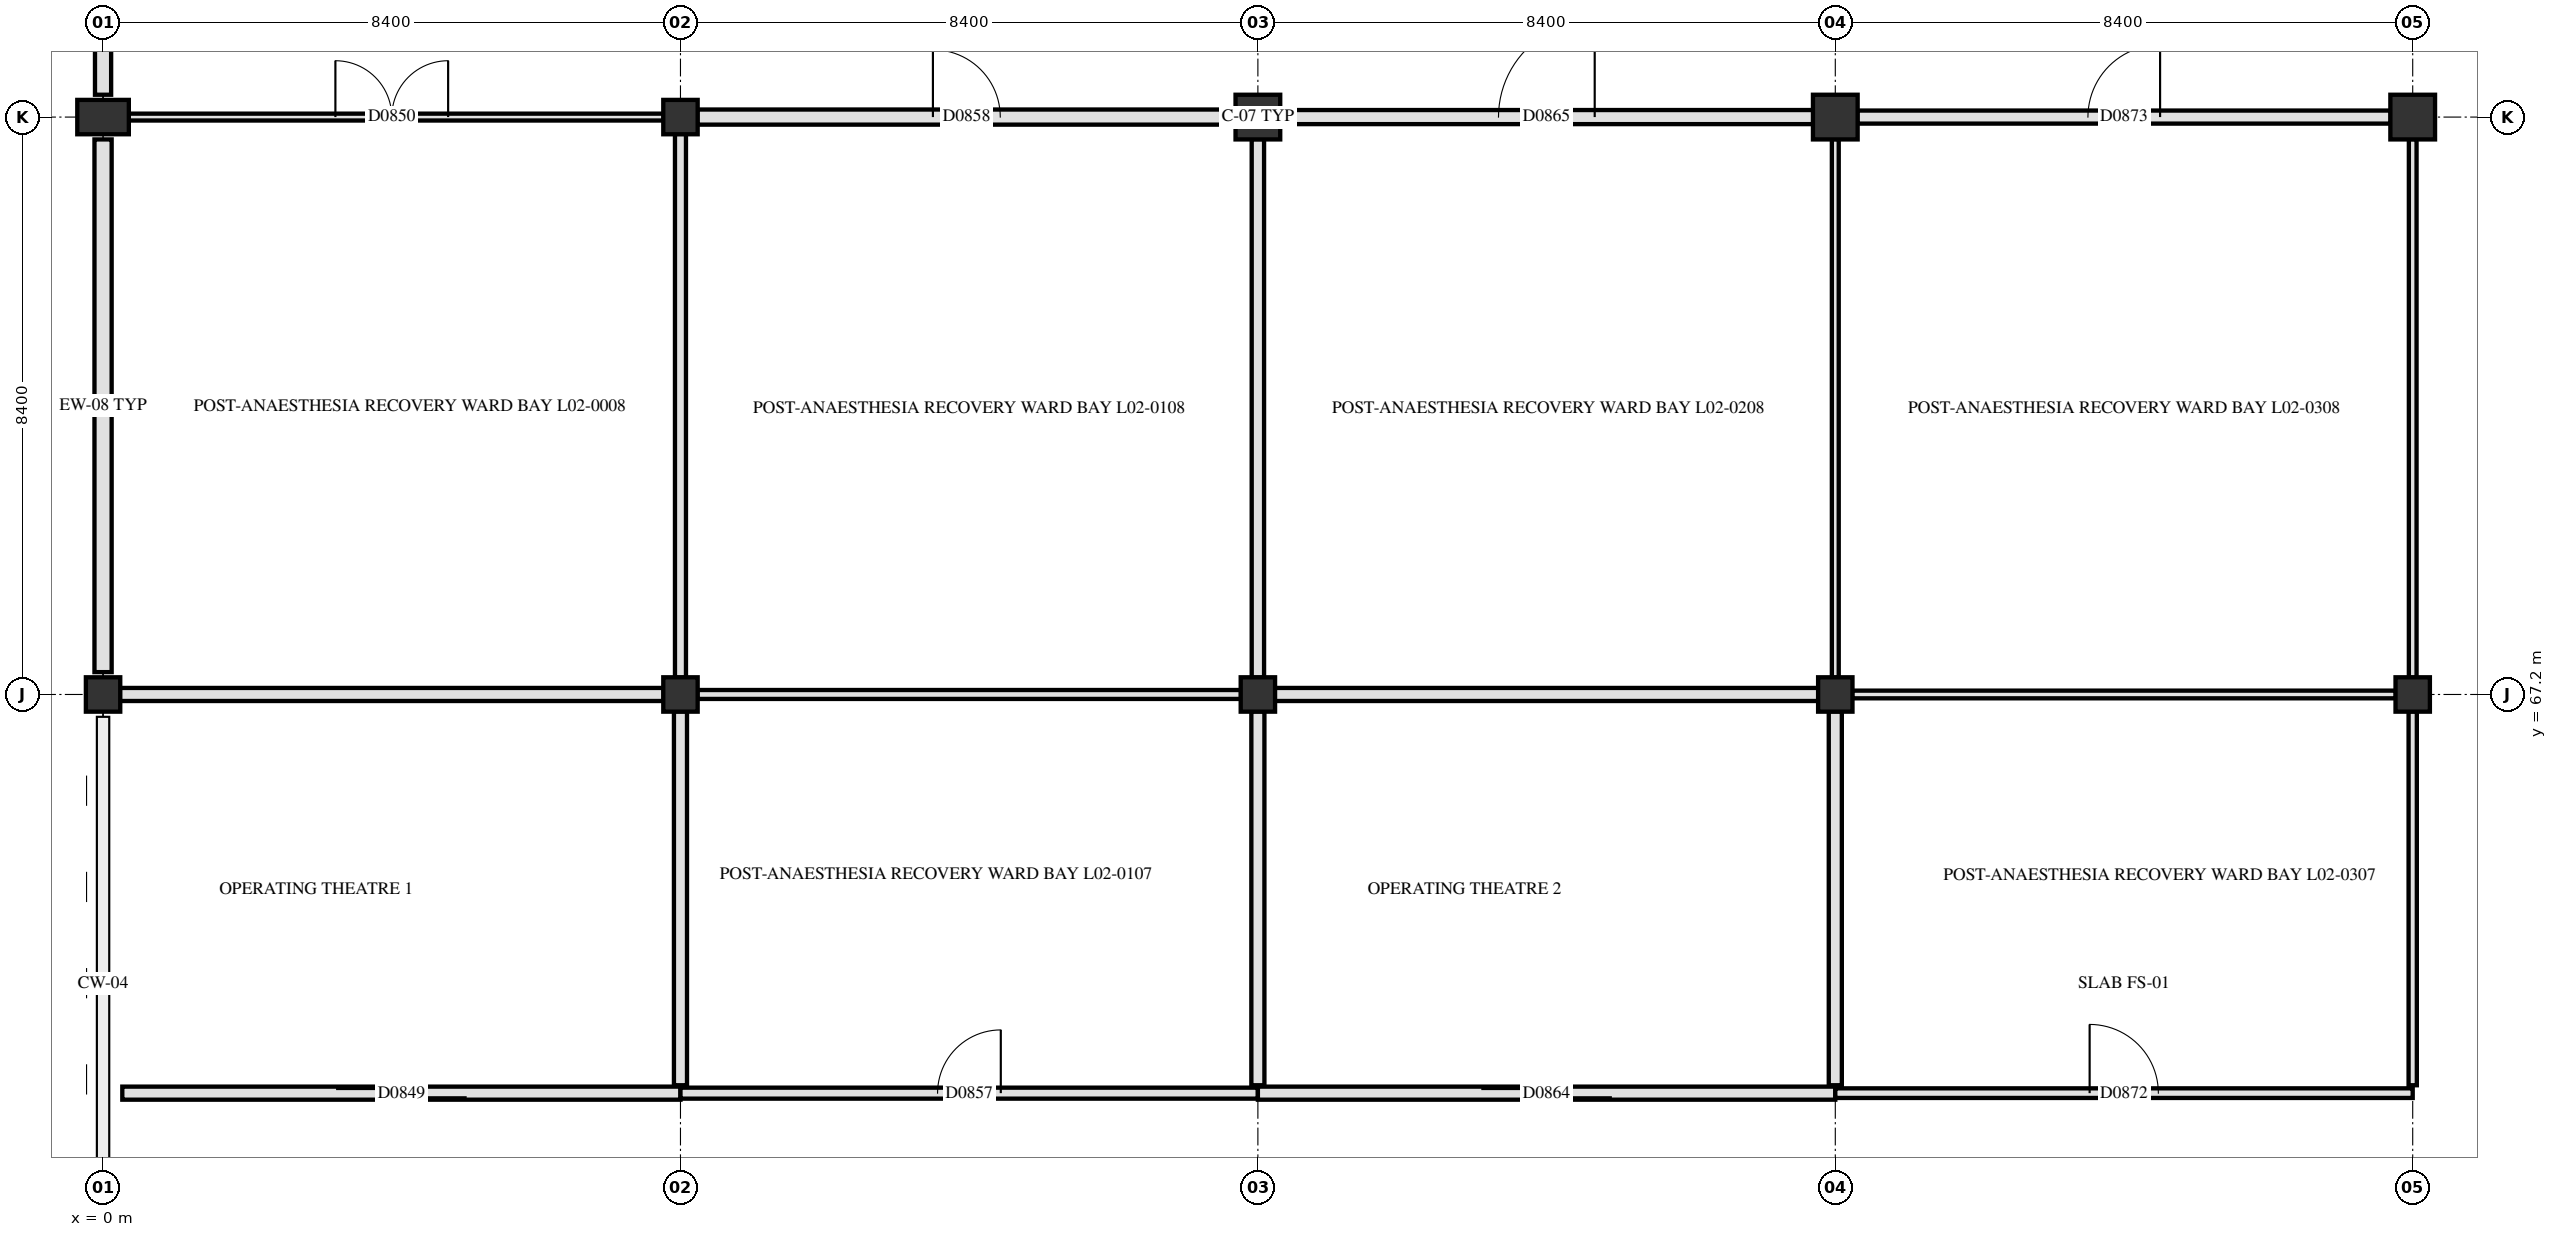
"""IFC4 building model, lengths in metres.
Left out: names, types, materials, properties, quantities, classifications, styles, units other than length and angle.
Written with IfcOpenShell. Run it as: python <this file> out.ifc"""

import sys

from ifc_helpers import new_model, si_unit, direction, frame, frame_2d, origin, origin_2d, place, context, subcontext, project, spatial, rectangle, circle, extrude, element, fill, save


model = new_model("IFC4")
c1 = context("Model", 3, precision=1e-05, world=origin(), true_north=direction((0.0, 1.0)))
c2 = subcontext(c1, "Body", "Model", "MODEL_VIEW")
j1 = project(units=[si_unit("LENGTHUNIT", "METRE"), si_unit("PLANEANGLEUNIT", "RADIAN")], contexts=[c1])
p1 = place(None, origin())
s1 = spatial("IfcSite", under=j1, at=p1, CompositionType="ELEMENT")
p2 = place(p1, origin())
s2 = spatial("IfcBuilding", under=s1, at=p2, CompositionType="ELEMENT")
p3 = place(p2, frame((0.0, 0.0, 9.3)))
s3 = spatial("IfcBuildingStorey", under=s2, at=p3, CompositionType="ELEMENT", Elevation=9.3)
p4 = place(p3, frame((0.0, 67.2, 0.0), z_axis=(0.0, 0.0, 1.0), x_axis=(1.0, 0.0, 0.0)))
e1 = element("IfcColumn", 1, at=p4, inside=s3, PredefinedType="COLUMN", context=c2, shape_type="SweptSolid", body=[
    extrude(rectangle(XDim=0.5, YDim=0.5, at=origin_2d()), origin(), (0.0, 0.0, 1.0), 5.1),
])
p5 = place(p3, frame((0.0, 75.6, 0.0), z_axis=(0.0, 0.0, 1.0), x_axis=(0.0, 1.0, 0.0)))
e2 = element("IfcColumn", 2, at=p5, inside=s3, PredefinedType="PILASTER", context=c2, shape_type="SweptSolid", body=[
    extrude(rectangle(XDim=0.5, YDim=0.75, at=origin_2d()), origin(), (0.0, 0.0, 1.0), 5.1),
])
for number, where, z_axis, x_axis in (
    (3, (8.4, 67.2, 0.0), (0.0, 0.0, 1.0), (1.0, 0.0, 0.0)),
    (4, (8.4, 75.6, 0.0), (0.0, 0.0, 1.0), (1.0, 0.0, 0.0)),
    (5, (16.8, 67.2, 0.0), (0.0, 0.0, 1.0), (1.0, 0.0, 0.0)),
):
    element("IfcColumn", number, at=place(p3, frame(where, z_axis=z_axis, x_axis=x_axis)), inside=s3, PredefinedType="COLUMN", context=c2, shape_type="SweptSolid", body=[
        extrude(rectangle(XDim=0.5, YDim=0.5, at=origin_2d()), origin(), (0.0, 0.0, 1.0), 5.1),
    ])
p6 = place(p3, frame((16.8, 75.6, 0.0), z_axis=(0.0, 0.0, 1.0), x_axis=(1.0, 0.0, 0.0)))
e6 = element("IfcColumn", 6, at=p6, inside=s3, PredefinedType="COLUMN", context=c2, shape_type="SweptSolid", body=[
    extrude(circle(Radius=0.325, at=origin_2d()), origin(), (0.0, 0.0, 1.0), 5.1),
])
p7 = place(p3, frame((25.2, 67.2, 0.0), z_axis=(0.0, 0.0, 1.0), x_axis=(1.0, 0.0, 0.0)))
e7 = element("IfcColumn", 7, at=p7, inside=s3, PredefinedType="COLUMN", context=c2, shape_type="SweptSolid", body=[
    extrude(rectangle(XDim=0.5, YDim=0.5, at=origin_2d()), origin(), (0.0, 0.0, 1.0), 5.1),
])
p8 = place(p3, frame((25.2, 75.6, 0.0), z_axis=(0.0, 0.0, 1.0), x_axis=(1.0, 0.0, 0.0)))
e8 = element("IfcColumn", 8, at=p8, inside=s3, PredefinedType="COLUMN", context=c2, shape_type="SweptSolid", body=[
    extrude(circle(Radius=0.325, at=origin_2d()), origin(), (0.0, 0.0, 1.0), 5.1),
])
p9 = place(p3, frame((33.6, 67.2, 0.0), z_axis=(0.0, 0.0, 1.0), x_axis=(1.0, 0.0, 0.0)))
e9 = element("IfcColumn", 9, at=p9, inside=s3, PredefinedType="COLUMN", context=c2, shape_type="SweptSolid", body=[
    extrude(rectangle(XDim=0.5, YDim=0.5, at=origin_2d()), origin(), (0.0, 0.0, 1.0), 5.1),
])
p10 = place(p3, frame((33.6, 75.6, 0.0), z_axis=(0.0, 0.0, 1.0), x_axis=(1.0, 0.0, 0.0)))
e10 = element("IfcColumn", 10, at=p10, inside=s3, PredefinedType="COLUMN", context=c2, shape_type="SweptSolid", body=[
    extrude(circle(Radius=0.325, at=origin_2d()), origin(), (0.0, 0.0, 1.0), 5.1),
])
p11 = place(p3, frame((0.0, 67.525, 0.0), z_axis=(0.0, 0.0, 1.0), x_axis=(0.0, 1.0, 0.0)))
e11 = element("IfcWall", 11, at=p11, inside=s3, PredefinedType="SOLIDWALL", context=c2, shape_type="SweptSolid", body=[
    extrude(rectangle(XDim=7.75, YDim=0.25, at=frame_2d((3.875, 0.0))), origin(), (0.0, 0.0, 1.0), 4.07),
])
p12 = place(p3, frame((0.0, 75.925, 0.0), z_axis=(0.0, 0.0, 1.0), x_axis=(0.0, 1.0, 0.0)))
e12 = element("IfcWall", 12, at=p12, inside=s3, PredefinedType="SOLIDWALL", context=c2, shape_type="SweptSolid", body=[
    extrude(rectangle(XDim=7.75, YDim=0.235, at=frame_2d((3.875, 0.0))), origin(), (0.0, 0.0, 1.0), 4.07),
])
p13 = place(p12, frame((1.012, 0.0, 0.85)))
e13 = element("IfcOpeningElement", 13, at=p13, cuts=e12, PredefinedType="OPENING", context=c2, shape_type="SweptSolid", body=[
    extrude(rectangle(XDim=1.85, YDim=1.3, at=frame_2d((0.925, 0.65))), frame((0.0, 0.127, 0.0), z_axis=(0.0, -1.0, 0.0), x_axis=(1.0, 0.0, 0.0)), (0.0, 0.0, 1.0), 0.255),
])
p14 = place(p12, frame((5.312, 0.0, 0.85)))
e14 = element("IfcOpeningElement", 14, at=p14, cuts=e12, PredefinedType="OPENING", context=c2, shape_type="SweptSolid", body=[
    extrude(rectangle(XDim=1.0, YDim=1.42, at=frame_2d((0.5, 0.71))), frame((0.0, 0.127, 0.0), z_axis=(0.0, -1.0, 0.0), x_axis=(1.0, 0.0, 0.0)), (0.0, 0.0, 1.0), 0.255),
])
p15 = place(p3, frame((0.28, 61.4, 0.0), z_axis=(0.0, 0.0, 1.0), x_axis=(1.0, 0.0, 0.0)))
e15 = element("IfcWall", 15, at=p15, inside=s3, PredefinedType="PARTITIONING", context=c2, shape_type="SweptSolid", body=[
    extrude(rectangle(XDim=8.12, YDim=0.19, at=frame_2d((4.06, 0.0))), origin(), (0.0, 0.0, 1.0), 4.17),
])
p16 = place(p15, frame((3.11, 0.0, 0.0)))
e16 = element("IfcOpeningElement", 16, at=p16, cuts=e15, PredefinedType="OPENING", context=c2, shape_type="SweptSolid", body=[
    extrude(rectangle(XDim=1.9, YDim=2.3, at=frame_2d((0.95, 1.15))), frame((0.0, 0.105, 0.0), z_axis=(0.0, -1.0, 0.0), x_axis=(1.0, 0.0, 0.0)), (0.0, 0.0, 1.0), 0.21),
])
p17 = place(p3, frame((8.4, 61.4, 0.0), z_axis=(0.0, 0.0, 1.0), x_axis=(1.0, 0.0, 0.0)))
e17 = element("IfcWall", 17, at=p17, inside=s3, PredefinedType="PARTITIONING", context=c2, shape_type="SweptSolid", body=[
    extrude(rectangle(XDim=8.4, YDim=0.16, at=frame_2d((4.2, 0.0))), origin(), (0.0, 0.0, 1.0), 4.17),
])
p18 = place(p17, frame((3.74, 0.0, 0.0)))
e18 = element("IfcOpeningElement", 18, at=p18, cuts=e17, PredefinedType="OPENING", context=c2, shape_type="SweptSolid", body=[
    extrude(rectangle(XDim=0.92, YDim=2.08, at=frame_2d((0.46, 1.04))), frame((0.0, 0.09, 0.0), z_axis=(0.0, -1.0, 0.0), x_axis=(1.0, 0.0, 0.0)), (0.0, 0.0, 1.0), 0.18),
])
p19 = place(p3, frame((16.8, 61.4, 0.0), z_axis=(0.0, 0.0, 1.0), x_axis=(1.0, 0.0, 0.0)))
e19 = element("IfcWall", 19, at=p19, inside=s3, PredefinedType="PARTITIONING", context=c2, shape_type="SweptSolid", body=[
    extrude(rectangle(XDim=8.4, YDim=0.19, at=frame_2d((4.2, 0.0))), origin(), (0.0, 0.0, 1.0), 4.17),
])
p20 = place(p19, frame((3.25, 0.0, 0.0)))
e20 = element("IfcOpeningElement", 20, at=p20, cuts=e19, PredefinedType="OPENING", context=c2, shape_type="SweptSolid", body=[
    extrude(rectangle(XDim=1.9, YDim=2.3, at=frame_2d((0.95, 1.15))), frame((0.0, 0.105, 0.0), z_axis=(0.0, -1.0, 0.0), x_axis=(1.0, 0.0, 0.0)), (0.0, 0.0, 1.0), 0.21),
])
p21 = place(p3, frame((25.2, 61.4, 0.0), z_axis=(0.0, 0.0, 1.0), x_axis=(1.0, 0.0, 0.0)))
e21 = element("IfcWall", 21, at=p21, inside=s3, PredefinedType="PARTITIONING", context=c2, shape_type="SweptSolid", body=[
    extrude(rectangle(XDim=8.4, YDim=0.14, at=frame_2d((4.2, 0.0))), origin(), (0.0, 0.0, 1.0), 4.17),
])
p22 = place(p21, frame((3.7, 0.0, 0.0)))
e22 = element("IfcOpeningElement", 22, at=p22, cuts=e21, PredefinedType="OPENING", context=c2, shape_type="SweptSolid", body=[
    extrude(rectangle(XDim=1.0, YDim=2.15, at=frame_2d((0.5, 1.075))), frame((0.0, 0.08, 0.0), z_axis=(0.0, -1.0, 0.0), x_axis=(1.0, 0.0, 0.0)), (0.0, 0.0, 1.0), 0.16),
])
p23 = place(p3, frame((0.245, 67.2, 0.0), z_axis=(0.0, 0.0, 1.0), x_axis=(1.0, 0.0, 0.0)))
e23 = element("IfcWall", 23, at=p23, inside=s3, PredefinedType="PARTITIONING", context=c2, shape_type="SweptSolid", body=[
    extrude(rectangle(XDim=7.91, YDim=0.19, at=frame_2d((3.955, 0.0))), origin(), (0.0, 0.0, 1.0), 4.02),
])
p24 = place(p3, frame((8.645, 67.2, 0.0), z_axis=(0.0, 0.0, 1.0), x_axis=(1.0, 0.0, 0.0)))
e24 = element("IfcWall", 24, at=p24, inside=s3, PredefinedType="PARTITIONING", context=c2, shape_type="SweptSolid", body=[
    extrude(rectangle(XDim=7.91, YDim=0.13, at=frame_2d((3.955, 0.0))), origin(), (0.0, 0.0, 1.0), 4.02),
])
p25 = place(p3, frame((17.045, 67.2, 0.0), z_axis=(0.0, 0.0, 1.0), x_axis=(1.0, 0.0, 0.0)))
e25 = element("IfcWall", 25, at=p25, inside=s3, PredefinedType="PARTITIONING", context=c2, shape_type="SweptSolid", body=[
    extrude(rectangle(XDim=7.91, YDim=0.19, at=frame_2d((3.955, 0.0))), origin(), (0.0, 0.0, 1.0), 4.02),
])
p26 = place(p3, frame((25.445, 67.2, 0.0), z_axis=(0.0, 0.0, 1.0), x_axis=(1.0, 0.0, 0.0)))
e26 = element("IfcWall", 26, at=p26, inside=s3, PredefinedType="PARTITIONING", context=c2, shape_type="SweptSolid", body=[
    extrude(rectangle(XDim=7.91, YDim=0.112, at=frame_2d((3.955, 0.0))), origin(), (0.0, 0.0, 1.0), 4.02),
])
p27 = place(p3, frame((0.245, 75.6, 0.0), z_axis=(0.0, 0.0, 1.0), x_axis=(1.0, 0.0, 0.0)))
e27 = element("IfcWall", 27, at=p27, inside=s3, PredefinedType="PARTITIONING", context=c2, shape_type="SweptSolid", body=[
    extrude(rectangle(XDim=7.91, YDim=0.1, at=frame_2d((3.955, 0.0))), origin(), (0.0, 0.0, 1.0), 4.02),
])
p28 = place(p27, frame((3.135, 0.0, 0.0)))
e28 = element("IfcOpeningElement", 28, at=p28, cuts=e27, PredefinedType="OPENING", context=c2, shape_type="SweptSolid", body=[
    extrude(rectangle(XDim=1.64, YDim=2.28, at=frame_2d((0.82, 1.14))), frame((0.0, 0.06, 0.0), z_axis=(0.0, -1.0, 0.0), x_axis=(1.0, 0.0, 0.0)), (0.0, 0.0, 1.0), 0.12),
])
p29 = place(p3, frame((8.645, 75.6, 0.0), z_axis=(0.0, 0.0, 1.0), x_axis=(1.0, 0.0, 0.0)))
e29 = element("IfcWall", 29, at=p29, inside=s3, PredefinedType="PARTITIONING", context=c2, shape_type="SweptSolid", body=[
    extrude(rectangle(XDim=7.835, YDim=0.22, at=frame_2d((3.917, 0.0))), origin(), (0.0, 0.0, 1.0), 4.02),
])
p30 = place(p29, frame((3.427, 0.0, 0.0)))
e30 = element("IfcOpeningElement", 30, at=p30, cuts=e29, PredefinedType="OPENING", context=c2, shape_type="SweptSolid", body=[
    extrude(rectangle(XDim=0.98, YDim=2.12, at=frame_2d((0.49, 1.06))), frame((0.0, 0.12, 0.0), z_axis=(0.0, -1.0, 0.0), x_axis=(1.0, 0.0, 0.0)), (0.0, 0.0, 1.0), 0.24),
])
p31 = place(p3, frame((17.12, 75.6, 0.0), z_axis=(0.0, 0.0, 1.0), x_axis=(1.0, 0.0, 0.0)))
e31 = element("IfcWall", 31, at=p31, inside=s3, PredefinedType="PARTITIONING", context=c2, shape_type="SweptSolid", body=[
    extrude(rectangle(XDim=7.76, YDim=0.205, at=frame_2d((3.88, 0.0))), origin(), (0.0, 0.0, 1.0), 4.02),
])
p32 = place(p31, frame((3.18, 0.0, 0.0)))
e32 = element("IfcOpeningElement", 32, at=p32, cuts=e31, PredefinedType="OPENING", context=c2, shape_type="SweptSolid", body=[
    extrude(rectangle(XDim=1.4, YDim=2.2, at=frame_2d((0.7, 1.1))), frame((0.0, 0.113, 0.0), z_axis=(0.0, -1.0, 0.0), x_axis=(1.0, 0.0, 0.0)), (0.0, 0.0, 1.0), 0.225),
])
p33 = place(p3, frame((25.52, 75.6, 0.0), z_axis=(0.0, 0.0, 1.0), x_axis=(1.0, 0.0, 0.0)))
e33 = element("IfcWall", 33, at=p33, inside=s3, PredefinedType="PARTITIONING", context=c2, shape_type="SweptSolid", body=[
    extrude(rectangle(XDim=7.76, YDim=0.19, at=frame_2d((3.88, 0.0))), origin(), (0.0, 0.0, 1.0), 4.02),
])
p34 = place(p33, frame((3.355, 0.0, 0.0)))
e34 = element("IfcOpeningElement", 34, at=p34, cuts=e33, PredefinedType="OPENING", context=c2, shape_type="SweptSolid", body=[
    extrude(rectangle(XDim=1.05, YDim=2.15, at=frame_2d((0.525, 1.075))), frame((0.0, 0.105, 0.0), z_axis=(0.0, -1.0, 0.0), x_axis=(1.0, 0.0, 0.0)), (0.0, 0.0, 1.0), 0.21),
])
p35 = place(p3, frame((8.4, 61.515, 0.0), z_axis=(0.0, 0.0, 1.0), x_axis=(0.0, 1.0, 0.0)))
e35 = element("IfcWall", 35, at=p35, inside=s3, PredefinedType="PARTITIONING", context=c2, shape_type="SweptSolid", body=[
    extrude(rectangle(XDim=5.44, YDim=0.19, at=frame_2d((2.72, 0.0))), origin(), (0.0, 0.0, 1.0), 4.17),
])
p36 = place(p3, frame((8.4, 67.445, 0.0), z_axis=(0.0, 0.0, 1.0), x_axis=(0.0, 1.0, 0.0)))
e36 = element("IfcWall", 36, at=p36, inside=s3, PredefinedType="PARTITIONING", context=c2, shape_type="SweptSolid", body=[
    extrude(rectangle(XDim=7.91, YDim=0.16, at=frame_2d((3.955, 0.0))), origin(), (0.0, 0.0, 1.0), 4.17),
])
p37 = place(p3, frame((16.8, 61.515, 0.0), z_axis=(0.0, 0.0, 1.0), x_axis=(0.0, 1.0, 0.0)))
e37 = element("IfcWall", 37, at=p37, inside=s3, PredefinedType="PARTITIONING", context=c2, shape_type="SweptSolid", body=[
    extrude(rectangle(XDim=5.44, YDim=0.19, at=frame_2d((2.72, 0.0))), origin(), (0.0, 0.0, 1.0), 4.17),
])
p38 = place(p3, frame((16.8, 67.445, 0.0), z_axis=(0.0, 0.0, 1.0), x_axis=(0.0, 1.0, 0.0)))
e38 = element("IfcWall", 38, at=p38, inside=s3, PredefinedType="PARTITIONING", context=c2, shape_type="SweptSolid", body=[
    extrude(rectangle(XDim=7.835, YDim=0.18, at=frame_2d((3.917, 0.0))), origin(), (0.0, 0.0, 1.0), 4.17),
])
p39 = place(p3, frame((25.2, 61.515, 0.0), z_axis=(0.0, 0.0, 1.0), x_axis=(0.0, 1.0, 0.0)))
e39 = element("IfcWall", 39, at=p39, inside=s3, PredefinedType="PARTITIONING", context=c2, shape_type="SweptSolid", body=[
    extrude(rectangle(XDim=5.44, YDim=0.19, at=frame_2d((2.72, 0.0))), origin(), (0.0, 0.0, 1.0), 4.17),
])
p40 = place(p3, frame((25.2, 67.445, 0.0), z_axis=(0.0, 0.0, 1.0), x_axis=(0.0, 1.0, 0.0)))
e40 = element("IfcWall", 40, at=p40, inside=s3, PredefinedType="PARTITIONING", context=c2, shape_type="SweptSolid", body=[
    extrude(rectangle(XDim=7.835, YDim=0.1, at=frame_2d((3.917, 0.0))), origin(), (0.0, 0.0, 1.0), 4.17),
])
p41 = place(p3, frame((33.6, 61.515, 0.0), z_axis=(0.0, 0.0, 1.0), x_axis=(0.0, 1.0, 0.0)))
e41 = element("IfcWall", 41, at=p41, inside=s3, PredefinedType="PARTITIONING", context=c2, shape_type="SweptSolid", body=[
    extrude(rectangle(XDim=5.44, YDim=0.12, at=frame_2d((2.72, 0.0))), origin(), (0.0, 0.0, 1.0), 4.17),
])
p42 = place(p3, frame((33.6, 67.445, 0.0), z_axis=(0.0, 0.0, 1.0), x_axis=(0.0, 1.0, 0.0)))
e42 = element("IfcWall", 42, at=p42, inside=s3, PredefinedType="PARTITIONING", context=c2, shape_type="SweptSolid", body=[
    extrude(rectangle(XDim=7.835, YDim=0.112, at=frame_2d((3.917, 0.0))), origin(), (0.0, 0.0, 1.0), 4.17),
])
p43 = place(p16, origin())
e43 = element("IfcDoor", 43, at=p43, inside=s3, OperationType="SLIDING_TO_LEFT", PredefinedType="DOOR", context=c2, shape_type="SweptSolid", body=[
    extrude(rectangle(XDim=1.9, YDim=2.3, at=frame_2d((0.95, 1.15))), frame((0.0, 0.025, 0.0), z_axis=(0.0, -1.0, 0.0), x_axis=(1.0, 0.0, 0.0)), (0.0, 0.0, 1.0), 0.05),
])
fill(e16, e43)
p44 = place(p28, origin())
e44 = element("IfcDoor", 44, at=p44, inside=s3, OperationType="DOUBLE_SWING_LEFT", PredefinedType="DOOR", context=c2, shape_type="SweptSolid", body=[
    extrude(rectangle(XDim=1.64, YDim=2.28, at=frame_2d((0.82, 1.14))), frame((0.0, 0.025, 0.0), z_axis=(0.0, -1.0, 0.0), x_axis=(1.0, 0.0, 0.0)), (0.0, 0.0, 1.0), 0.05),
])
fill(e28, e44)
p45 = place(p18, origin())
e45 = element("IfcDoor", 45, at=p45, inside=s3, OperationType="SINGLE_SWING_RIGHT", PredefinedType="DOOR", context=c2, shape_type="SweptSolid", body=[
    extrude(rectangle(XDim=0.92, YDim=2.08, at=frame_2d((0.46, 1.04))), frame((0.0, 0.025, 0.0), z_axis=(0.0, -1.0, 0.0), x_axis=(1.0, 0.0, 0.0)), (0.0, 0.0, 1.0), 0.05),
])
fill(e18, e45)
p46 = place(p30, origin())
e46 = element("IfcDoor", 46, at=p46, inside=s3, OperationType="SINGLE_SWING_LEFT", PredefinedType="DOOR", context=c2, shape_type="SweptSolid", body=[
    extrude(rectangle(XDim=0.98, YDim=2.12, at=frame_2d((0.49, 1.06))), frame((0.0, 0.025, 0.0), z_axis=(0.0, -1.0, 0.0), x_axis=(1.0, 0.0, 0.0)), (0.0, 0.0, 1.0), 0.05),
])
fill(e30, e46)
p47 = place(p20, origin())
e47 = element("IfcDoor", 47, at=p47, inside=s3, OperationType="SLIDING_TO_LEFT", PredefinedType="DOOR", context=c2, shape_type="SweptSolid", body=[
    extrude(rectangle(XDim=1.9, YDim=2.3, at=frame_2d((0.95, 1.15))), frame((0.0, 0.025, 0.0), z_axis=(0.0, -1.0, 0.0), x_axis=(1.0, 0.0, 0.0)), (0.0, 0.0, 1.0), 0.05),
])
fill(e20, e47)
p48 = place(p32, origin())
e48 = element("IfcDoor", 48, at=p48, inside=s3, OperationType="SINGLE_SWING_RIGHT", PredefinedType="DOOR", context=c2, shape_type="SweptSolid", body=[
    extrude(rectangle(XDim=1.4, YDim=2.2, at=frame_2d((0.7, 1.1))), frame((0.0, 0.025, 0.0), z_axis=(0.0, -1.0, 0.0), x_axis=(1.0, 0.0, 0.0)), (0.0, 0.0, 1.0), 0.05),
])
fill(e32, e48)
p49 = place(p22, origin())
e49 = element("IfcDoor", 49, at=p49, inside=s3, OperationType="SINGLE_SWING_LEFT", PredefinedType="DOOR", context=c2, shape_type="SweptSolid", body=[
    extrude(rectangle(XDim=1.0, YDim=2.15, at=frame_2d((0.5, 1.075))), frame((0.0, 0.025, 0.0), z_axis=(0.0, -1.0, 0.0), x_axis=(1.0, 0.0, 0.0)), (0.0, 0.0, 1.0), 0.05),
])
fill(e22, e49)
p50 = place(p34, origin())
e50 = element("IfcDoor", 50, at=p50, inside=s3, OperationType="SINGLE_SWING_RIGHT", PredefinedType="DOOR", context=c2, shape_type="SweptSolid", body=[
    extrude(rectangle(XDim=1.05, YDim=2.15, at=frame_2d((0.525, 1.075))), frame((0.0, 0.025, 0.0), z_axis=(0.0, -1.0, 0.0), x_axis=(1.0, 0.0, 0.0)), (0.0, 0.0, 1.0), 0.05),
])
fill(e34, e50)
save(model, sys.argv[1])
